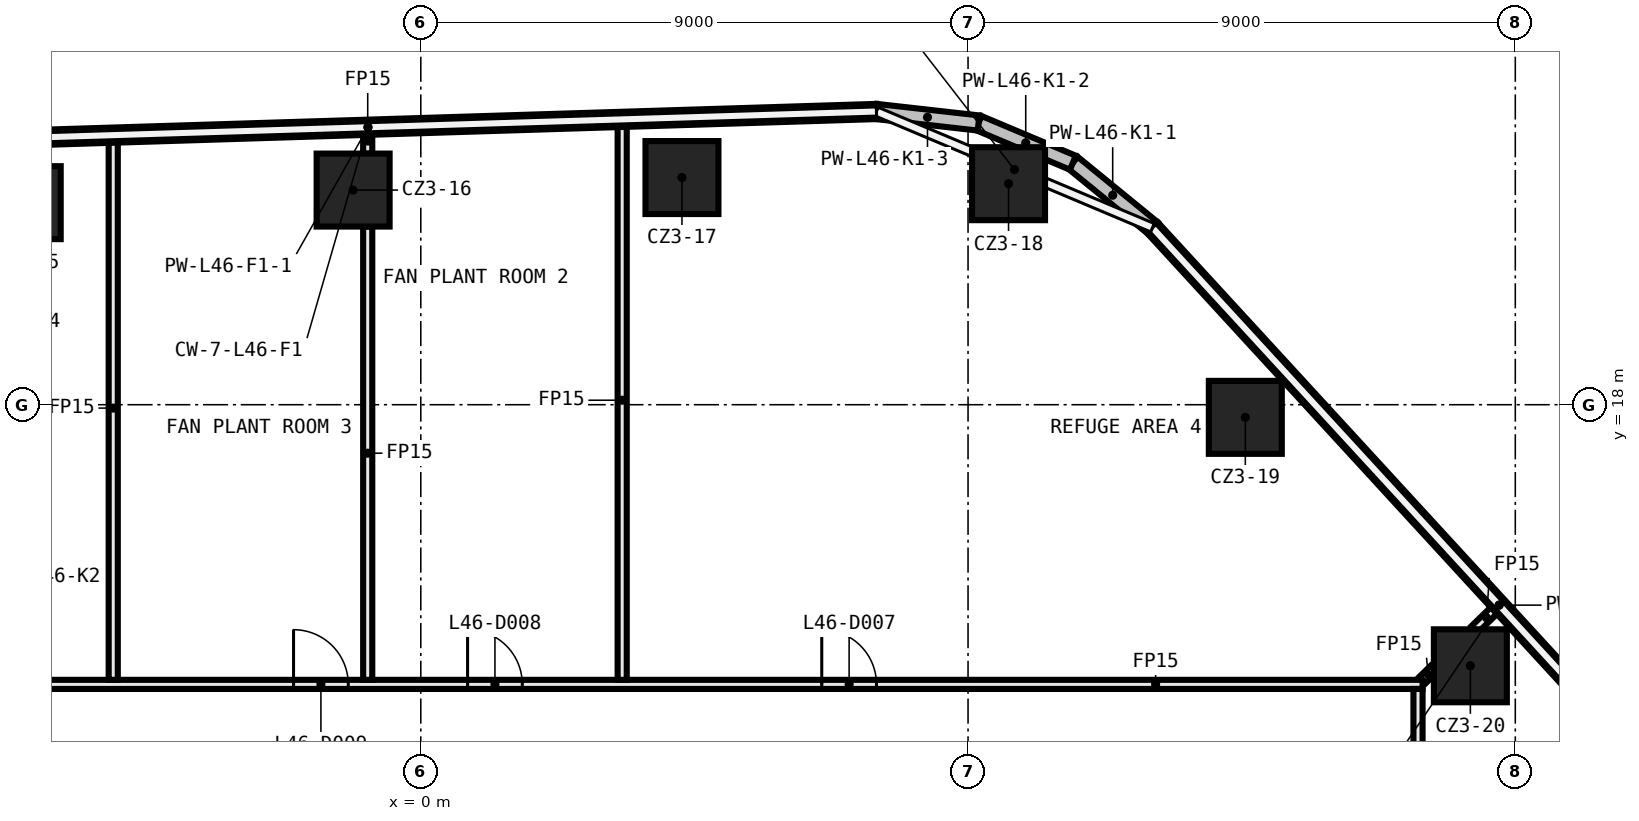
"""IFC4 building model, lengths in metres.
Left out: names, types, materials, properties, quantities, classifications, styles, units other than length and angle.
Written with IfcOpenShell. Run it as: python <this file> out.ifc"""

import sys

from ifc_helpers import new_model, si_unit, direction, frame, frame_2d, origin, origin_2d, place, context, subcontext, project, spatial, rectangle, extrude, element, fill, save


model = new_model("IFC4")
c1 = context("Model", 3, precision=1e-05, world=origin(), true_north=direction((0.0, 1.0)))
c2 = subcontext(c1, "Body", "Model", "MODEL_VIEW")
j1 = project(units=[si_unit("LENGTHUNIT", "METRE"), si_unit("PLANEANGLEUNIT", "RADIAN")], contexts=[c1])
p1 = place(None, origin())
s1 = spatial("IfcSite", under=j1, at=p1, CompositionType="ELEMENT")
p2 = place(p1, origin())
s2 = spatial("IfcBuilding", under=s1, at=p2, CompositionType="ELEMENT")
p3 = place(p2, frame((0.0, 0.0, 220.6)))
s3 = spatial("IfcBuildingStorey", under=s2, at=p3, CompositionType="ELEMENT", Elevation=220.6)
for number, where, z_axis, x_axis in (
    (1, (-6.522, 21.323, 0.0), (0.0, 0.0, 1.0), (1.0, 0.0, 0.0)),
    (2, (-1.113, 21.53, 0.0), (0.0, 0.0, 1.0), (1.0, 0.0, 0.0)),
    (3, (4.295, 21.736, 0.0), (0.0, 0.0, 1.0), (1.0, 0.0, 0.0)),
    (4, (9.666, 21.635, 0.0), (0.0, 0.0, 1.0), (1.0, 0.0, 0.0)),
    (5, (13.56, 17.792, 0.0), (0.0, 0.0, 1.0), (1.0, 0.0, 0.0)),
    (6, (17.261, 13.706, 0.0), (0.0, 0.0, 1.0), (1.0, 0.0, 0.0)),
):
    element("IfcColumn", number, at=place(p3, frame(where, z_axis=z_axis, x_axis=x_axis)), inside=s3, PredefinedType="COLUMN", context=c2, shape_type="SweptSolid", body=[
        extrude(rectangle(XDim=1.2, YDim=1.2, at=origin_2d()), origin(), (0.0, 0.0, 1.0), 7.55),
    ])
p4 = place(p3, frame((-16.475, 13.4, 0.0), z_axis=(0.0, 0.0, 1.0), x_axis=(1.0, 0.0, 0.0)))
e7 = element("IfcWall", 7, at=p4, inside=s3, PredefinedType="PARTITIONING", context=c2, shape_type="SweptSolid", body=[
    extrude(rectangle(XDim=32.95, YDim=0.15, at=frame_2d((16.475, 0.0))), origin(), (0.0, 0.0, 1.0), 7.55),
])
p5 = place(p4, frame((23.069, 0.0, 0.0)))
e8 = element("IfcOpeningElement", 8, at=p5, cuts=e7, PredefinedType="OPENING", context=c2, shape_type="SweptSolid", body=[
    extrude(rectangle(XDim=0.9, YDim=2.1, at=frame_2d((0.45, 1.05))), frame((0.0, 0.085, 0.0), z_axis=(0.0, -1.0, 0.0), x_axis=(1.0, 0.0, 0.0)), (0.0, 0.0, 1.0), 0.17),
])
p6 = place(p4, frame((17.244, 0.0, 0.0)))
e9 = element("IfcOpeningElement", 9, at=p6, cuts=e7, PredefinedType="OPENING", context=c2, shape_type="SweptSolid", body=[
    extrude(rectangle(XDim=0.9, YDim=2.1, at=frame_2d((0.45, 1.05))), frame((0.0, 0.085, 0.0), z_axis=(0.0, -1.0, 0.0), x_axis=(1.0, 0.0, 0.0)), (0.0, 0.0, 1.0), 0.17),
])
p7 = place(p4, frame((14.382, 0.0, 0.0)))
e10 = element("IfcOpeningElement", 10, at=p7, cuts=e7, PredefinedType="OPENING", context=c2, shape_type="SweptSolid", body=[
    extrude(rectangle(XDim=0.9, YDim=2.1, at=frame_2d((0.45, 1.05))), frame((0.0, 0.085, 0.0), z_axis=(0.0, -1.0, 0.0), x_axis=(1.0, 0.0, 0.0)), (0.0, 0.0, 1.0), 0.17),
])
p8 = place(p4, frame((8.874, 0.0, 0.0)))
e11 = element("IfcOpeningElement", 11, at=p8, cuts=e7, PredefinedType="OPENING", context=c2, shape_type="SweptSolid", body=[
    extrude(rectangle(XDim=0.9, YDim=2.1, at=frame_2d((0.45, 1.05))), frame((0.0, 0.085, 0.0), z_axis=(0.0, -1.0, 0.0), x_axis=(1.0, 0.0, 0.0)), (0.0, 0.0, 1.0), 0.17),
])
p9 = place(p4, frame((5.575, 0.0, 0.0)))
e12 = element("IfcOpeningElement", 12, at=p9, cuts=e7, PredefinedType="OPENING", context=c2, shape_type="SweptSolid", body=[
    extrude(rectangle(XDim=0.9, YDim=2.1, at=frame_2d((0.45, 1.05))), frame((0.0, 0.085, 0.0), z_axis=(0.0, -1.0, 0.0), x_axis=(1.0, 0.0, 0.0)), (0.0, 0.0, 1.0), 0.17),
])
p10 = place(p3, frame((16.478, 13.475, 0.0), z_axis=(0.0, 0.0, 1.0), x_axis=(0.716596850533, 0.697487601185, 0.0)))
e13 = element("IfcWall", 13, at=p10, inside=s3, PredefinedType="PARTITIONING", context=c2, shape_type="SweptSolid", body=[
    extrude(rectangle(XDim=0.256, YDim=0.15, at=frame_2d((0.128, 0.0))), origin(), (0.0, 0.0, 1.0), 7.55),
])
p11 = place(p3, frame((17.332, 14.306, 0.0), z_axis=(0.0, 0.0, 1.0), x_axis=(0.716671472449, 0.697410926627, 0.0)))
e14 = element("IfcWall", 14, at=p11, inside=s3, PredefinedType="PARTITIONING", context=c2, shape_type="SweptSolid", body=[
    extrude(rectangle(XDim=0.545, YDim=0.15, at=frame_2d((0.272, 0.0))), origin(), (0.0, 0.0, 1.0), 7.55),
])
p12 = place(p3, frame((16.4, 13.325, 0.0), z_axis=(0.0, 0.0, 1.0), x_axis=(0.0, -1.0, 0.0)))
e15 = element("IfcWall", 15, at=p12, inside=s3, PredefinedType="PARTITIONING", context=c2, shape_type="SweptSolid", body=[
    extrude(rectangle(XDim=26.65, YDim=0.15, at=frame_2d((13.325, 0.0))), origin(), (0.0, 0.0, 1.0), 7.55),
])
p13 = place(p12, frame((20.239, 0.0, 0.0)))
e16 = element("IfcOpeningElement", 16, at=p13, cuts=e15, PredefinedType="OPENING", context=c2, shape_type="SweptSolid", body=[
    extrude(rectangle(XDim=0.9, YDim=2.1, at=frame_2d((0.45, 1.05))), frame((0.0, 0.085, 0.0), z_axis=(0.0, -1.0, 0.0), x_axis=(1.0, 0.0, 0.0)), (0.0, 0.0, 1.0), 0.17),
])
p14 = place(p12, frame((2.668, 0.0, 0.0)))
e17 = element("IfcOpeningElement", 17, at=p14, cuts=e15, PredefinedType="OPENING", context=c2, shape_type="SweptSolid", body=[
    extrude(rectangle(XDim=0.9, YDim=2.1, at=frame_2d((0.45, 1.05))), frame((0.0, 0.085, 0.0), z_axis=(0.0, -1.0, 0.0), x_axis=(1.0, 0.0, 0.0)), (0.0, 0.0, 1.0), 0.17),
])
p15 = place(p3, frame((3.312, 13.475, 0.0), z_axis=(0.0, 0.0, 1.0), x_axis=(0.0, 1.0, 0.0)))
e18 = element("IfcWall", 18, at=p15, inside=s3, PredefinedType="PARTITIONING", context=c2, shape_type="SweptSolid", body=[
    extrude(rectangle(XDim=9.198, YDim=0.15, at=frame_2d((4.599, 0.0))), origin(), (0.0, 0.0, 1.0), 7.55),
])
p16 = place(p3, frame((-0.873, 13.475, 0.0), z_axis=(0.0, 0.0, 1.0), x_axis=(0.0, 1.0, 0.0)))
e19 = element("IfcWall", 19, at=p16, inside=s3, PredefinedType="PARTITIONING", context=c2, shape_type="SweptSolid", body=[
    extrude(rectangle(XDim=7.455, YDim=0.15, at=frame_2d((3.728, 0.0))), origin(), (0.0, 0.0, 1.0), 7.55),
])
p17 = place(p3, frame((-0.873, 22.13, 0.0), z_axis=(0.0, 0.0, 1.0), x_axis=(0.0, 1.0, 0.0)))
e20 = element("IfcWall", 20, at=p17, inside=s3, PredefinedType="PARTITIONING", context=c2, shape_type="SweptSolid", body=[
    extrude(rectangle(XDim=0.413, YDim=0.15, at=frame_2d((0.207, 0.0))), origin(), (0.0, 0.0, 1.0), 7.55),
])
p18 = place(p3, frame((-5.058, 13.475, 0.0), z_axis=(0.0, 0.0, 1.0), x_axis=(0.0, 1.0, 0.0)))
e21 = element("IfcWall", 21, at=p18, inside=s3, PredefinedType="PARTITIONING", context=c2, shape_type="SweptSolid", body=[
    extrude(rectangle(XDim=8.938, YDim=0.15, at=frame_2d((4.469, 0.0))), origin(), (0.0, 0.0, 1.0), 7.55),
])
p19 = place(p3, frame((23.434, 8.496, 0.0), z_axis=(0.0, 0.0, 1.0), x_axis=(-0.676389444632, 0.736544173278, 0.0)))
e22 = element("IfcWall", 22, at=p19, inside=s3, PredefinedType="SOLIDWALL", context=c2, shape_type="SweptSolid", body=[
    extrude(rectangle(XDim=16.855, YDim=0.25, at=frame_2d((8.428, 0.0))), origin(), (0.0, 0.0, 1.0), 7.55),
])
p20 = place(p3, frame((12.033, 20.911, 0.0), z_axis=(0.0, 0.0, 1.0), x_axis=(-0.7745875531, 0.632466696816, 0.0)))
e23 = element("IfcWall", 23, at=p20, inside=s3, PredefinedType="SOLIDWALL", context=c2, shape_type="SweptSolid", body=[
    extrude(rectangle(XDim=1.69, YDim=0.25, at=frame_2d((0.845, 0.0))), origin(), (0.0, 0.0, 1.0), 7.55),
])
p21 = place(p3, frame((10.724, 21.98, 0.0), z_axis=(0.0, 0.0, 1.0), x_axis=(-0.921654486632, 0.388011607136, 0.0)))
e24 = element("IfcWall", 24, at=p21, inside=s3, PredefinedType="SOLIDWALL", context=c2, shape_type="SweptSolid", body=[
    extrude(rectangle(XDim=1.683, YDim=0.25, at=frame_2d((0.842, 0.0))), origin(), (0.0, 0.0, 1.0), 7.55),
])
p22 = place(p3, frame((9.173, 22.633, 0.0), z_axis=(0.0, 0.0, 1.0), x_axis=(-0.993715260026, 0.11193740211, 0.0)))
e25 = element("IfcWall", 25, at=p22, inside=s3, PredefinedType="SOLIDWALL", context=c2, shape_type="SweptSolid", body=[
    extrude(rectangle(XDim=1.69, YDim=0.25, at=frame_2d((0.845, 0.0))), origin(), (0.0, 0.0, 1.0), 7.55),
])
p23 = place(p3, frame((7.493, 22.822, 0.0), z_axis=(0.0, 0.0, 1.0), x_axis=(-0.999520551637, -0.030962345779, 0.0)))
e26 = element("IfcWall", 26, at=p23, inside=s3, PredefinedType="SOLIDWALL", context=c2, shape_type="SweptSolid", body=[
    extrude(rectangle(XDim=16.732, YDim=0.25, at=frame_2d((8.366, 0.0))), origin(), (0.0, 0.0, 1.0), 7.55),
])
p24 = place(p5, origin())
e27 = element("IfcDoor", 27, at=p24, inside=s3, OperationType="SINGLE_SWING_RIGHT", PredefinedType="DOOR", context=c2, shape_type="SweptSolid", body=[
    extrude(rectangle(XDim=0.9, YDim=2.1, at=frame_2d((0.45, 1.05))), frame((0.0, 0.025, 0.0), z_axis=(0.0, -1.0, 0.0), x_axis=(1.0, 0.0, 0.0)), (0.0, 0.0, 1.0), 0.05),
])
fill(e8, e27)
p25 = place(p6, origin())
e28 = element("IfcDoor", 28, at=p25, inside=s3, OperationType="SINGLE_SWING_LEFT", PredefinedType="DOOR", context=c2, shape_type="SweptSolid", body=[
    extrude(rectangle(XDim=0.9, YDim=2.1, at=frame_2d((0.45, 1.05))), frame((0.0, 0.025, 0.0), z_axis=(0.0, -1.0, 0.0), x_axis=(1.0, 0.0, 0.0)), (0.0, 0.0, 1.0), 0.05),
])
fill(e9, e28)
p26 = place(p7, origin())
e29 = element("IfcDoor", 29, at=p26, inside=s3, OperationType="SINGLE_SWING_RIGHT", PredefinedType="DOOR", context=c2, shape_type="SweptSolid", body=[
    extrude(rectangle(XDim=0.9, YDim=2.1, at=frame_2d((0.45, 1.05))), frame((0.0, 0.025, 0.0), z_axis=(0.0, -1.0, 0.0), x_axis=(1.0, 0.0, 0.0)), (0.0, 0.0, 1.0), 0.05),
])
fill(e10, e29)
save(model, sys.argv[1])
